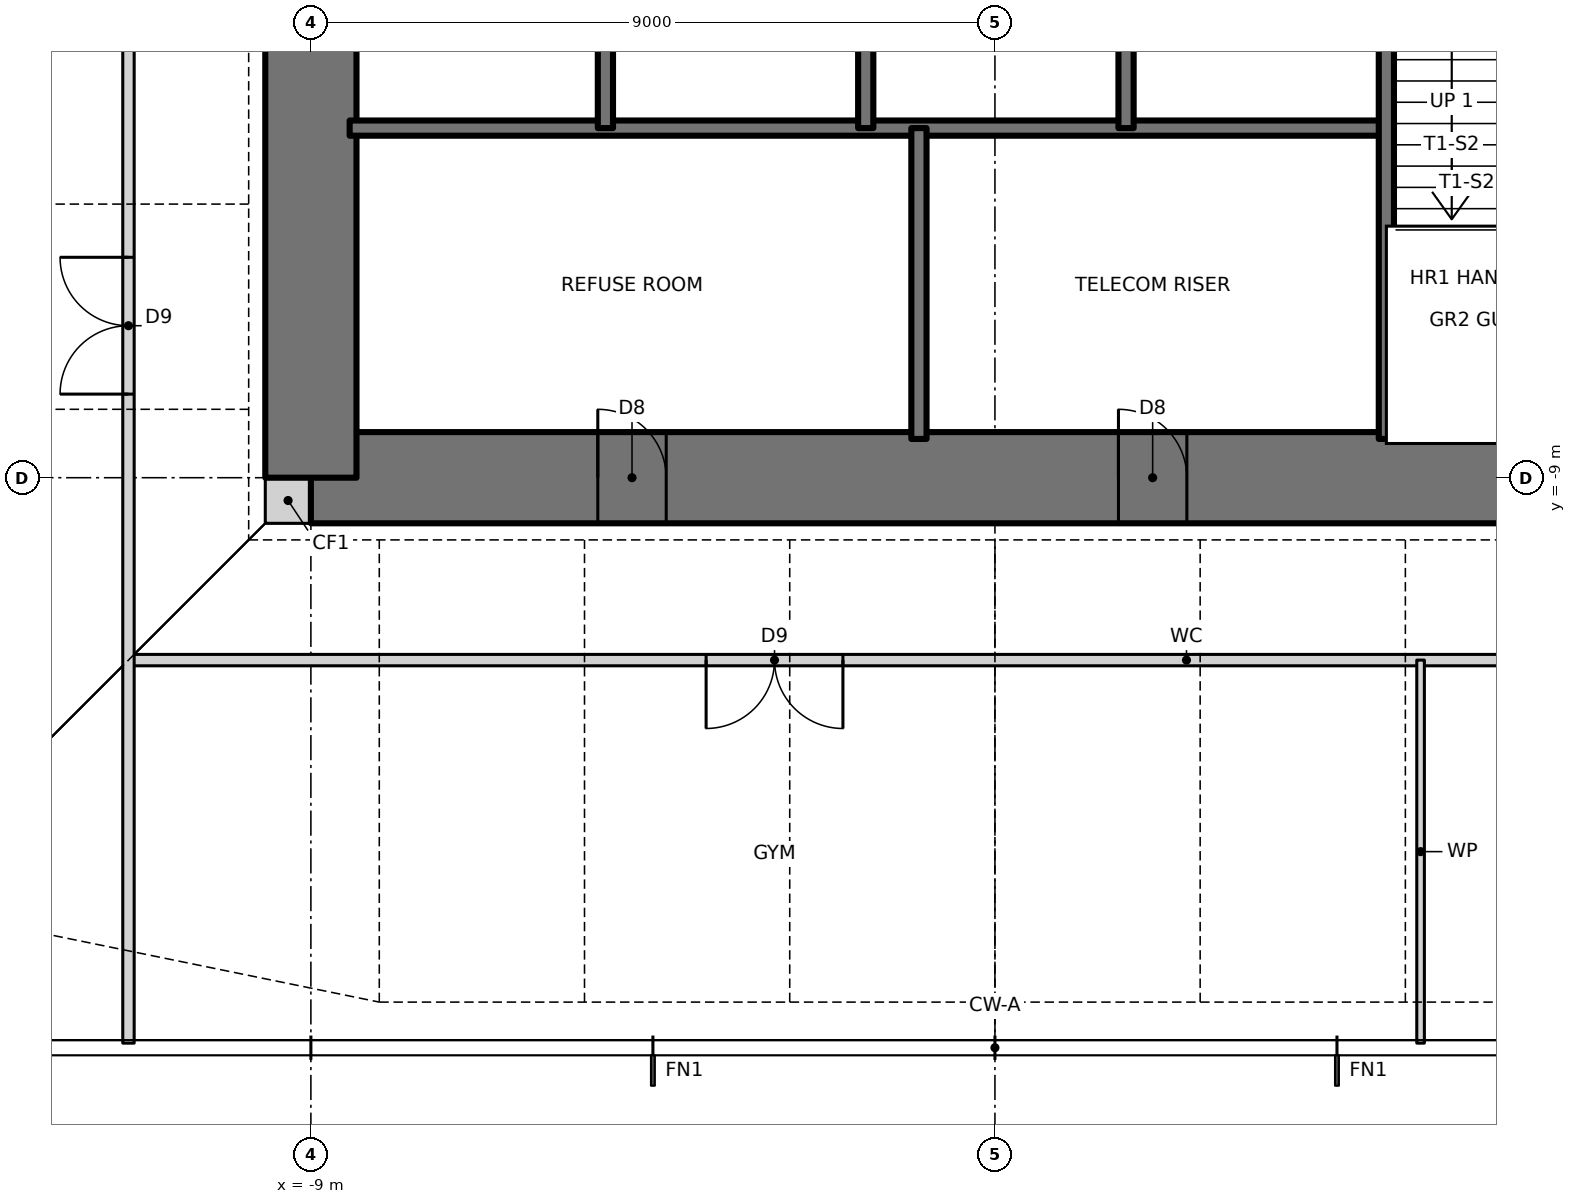
"""IFC4 building model, lengths in metres.
Left out: names, types, materials, properties, quantities, classifications, styles, units other than length and angle.
Written with IfcOpenShell. Run it as: python <this file> out.ifc"""

import sys

from ifc_helpers import new_model, si_unit, direction, frame, frame_2d, origin, place, context, subcontext, project, spatial, rectangle, extrude, element, fill, save


model = new_model("IFC4")
c1 = context("Model", 3, precision=1e-05, world=origin(), true_north=direction((0.0, 1.0)))
c2 = subcontext(c1, "Body", "Model", "MODEL_VIEW")
j1 = project(units=[si_unit("LENGTHUNIT", "METRE"), si_unit("PLANEANGLEUNIT", "RADIAN")], contexts=[c1])
p1 = place(None, origin())
s1 = spatial("IfcSite", under=j1, at=p1, CompositionType="ELEMENT")
p2 = place(p1, origin())
s2 = spatial("IfcBuilding", under=s1, at=p2, CompositionType="ELEMENT")
p3 = place(p2, frame((0.0, 0.0, 215.0)))
s3 = spatial("IfcBuildingStorey", under=s2, at=p3, CompositionType="ELEMENT", Elevation=215.0)
p4 = place(p3, frame((-9.6, -9.3, 0.0), z_axis=(0.0, 0.0, 1.0), x_axis=(1.0, 0.0, 0.0)))
e1 = element("IfcWall", 1, at=p4, inside=s3, PredefinedType="SOLIDWALL", context=c2, shape_type="SweptSolid", body=[
    extrude(rectangle(XDim=0.6, YDim=0.6, at=frame_2d((0.3, 0.0))), origin(), (0.0, 0.0, 1.0), 3.5),
])
p5 = place(p3, frame((-9.0, -9.0, 0.0), z_axis=(0.0, 0.0, 1.0), x_axis=(1.0, 0.0, 0.0)))
e2 = element("IfcWall", 2, at=p5, inside=s3, PredefinedType="SHEAR", context=c2, shape_type="SweptSolid", body=[
    extrude(rectangle(XDim=18.0, YDim=1.2, at=frame_2d((9.0, 0.0))), origin(), (0.0, 0.0, 1.0), 3.5),
])
p6 = place(p5, frame((3.775, 0.0, 0.0)))
e3 = element("IfcOpeningElement", 3, at=p6, cuts=e2, PredefinedType="OPENING", context=c2, shape_type="SweptSolid", body=[
    extrude(rectangle(XDim=0.9, YDim=2.1, at=frame_2d((0.45, 1.05))), frame((0.0, 0.61, 0.0), z_axis=(0.0, -1.0, 0.0), x_axis=(1.0, 0.0, 0.0)), (0.0, 0.0, 1.0), 1.22),
])
p7 = place(p5, frame((10.625, 0.0, 0.0)))
e4 = element("IfcOpeningElement", 4, at=p7, cuts=e2, PredefinedType="OPENING", context=c2, shape_type="SweptSolid", body=[
    extrude(rectangle(XDim=0.9, YDim=2.1, at=frame_2d((0.45, 1.05))), frame((0.0, 0.61, 0.0), z_axis=(0.0, -1.0, 0.0), x_axis=(1.0, 0.0, 0.0)), (0.0, 0.0, 1.0), 1.22),
])
p8 = place(p3, frame((-9.0, 9.0, 0.0), z_axis=(0.0, 0.0, 1.0), x_axis=(0.0, -1.0, 0.0)))
e5 = element("IfcWall", 5, at=p8, inside=s3, PredefinedType="SHEAR", context=c2, shape_type="SweptSolid", body=[
    extrude(rectangle(XDim=18.0, YDim=1.2, at=frame_2d((9.0, 0.0))), origin(), (0.0, 0.0, 1.0), 3.5),
])
p9 = place(p8, frame((8.5, 0.0, 0.0)))
e6 = element("IfcOpeningElement", 6, at=p9, cuts=e5, PredefinedType="OPENING", context=c2, shape_type="SweptSolid", body=[
    extrude(rectangle(XDim=1.0, YDim=2.1, at=frame_2d((0.5, 1.05))), frame((0.0, 0.61, 0.0), z_axis=(0.0, -1.0, 0.0), x_axis=(1.0, 0.0, 0.0)), (0.0, 0.0, 1.0), 1.22),
])
p10 = place(p3, frame((-11.4, -11.4, 0.0), z_axis=(0.0, 0.0, 1.0), x_axis=(1.0, 0.0, 0.0)))
e7 = element("IfcWall", 7, at=p10, inside=s3, PredefinedType="PARTITIONING", context=c2, shape_type="SweptSolid", body=[
    extrude(rectangle(XDim=27.84, YDim=0.15, at=frame_2d((13.92, 0.0))), origin(), (0.0, 0.0, 1.0), 3.27),
])
p11 = place(p10, frame((7.6, 0.0, 0.0)))
e8 = element("IfcOpeningElement", 8, at=p11, cuts=e7, PredefinedType="OPENING", context=c2, shape_type="SweptSolid", body=[
    extrude(rectangle(XDim=1.8, YDim=2.1, at=frame_2d((0.9, 1.05))), frame((0.0, 0.085, 0.0), z_axis=(0.0, -1.0, 0.0), x_axis=(1.0, 0.0, 0.0)), (0.0, 0.0, 1.0), 0.17),
])
p12 = place(p10, frame((19.0, 0.0, 0.0)))
e9 = element("IfcOpeningElement", 9, at=p12, cuts=e7, PredefinedType="OPENING", context=c2, shape_type="SweptSolid", body=[
    extrude(rectangle(XDim=1.8, YDim=2.1, at=frame_2d((0.9, 1.05))), frame((0.0, 0.085, 0.0), z_axis=(0.0, -1.0, 0.0), x_axis=(1.0, 0.0, 0.0)), (0.0, 0.0, 1.0), 0.17),
])
p13 = place(p3, frame((-8.49, -4.4, 0.0), z_axis=(0.0, 0.0, 1.0), x_axis=(1.0, 0.0, 0.0)))
e10 = element("IfcWall", 10, at=p13, inside=s3, PredefinedType="SOLIDWALL", context=c2, shape_type="SweptSolid", body=[
    extrude(rectangle(XDim=13.64, YDim=0.2, at=frame_2d((6.82, 0.0))), origin(), (0.0, 0.0, 1.0), 3.5),
])
p14 = place(p3, frame((5.6, -16.44, 0.0), z_axis=(0.0, 0.0, 1.0), x_axis=(0.0, 1.0, 0.0)))
e11 = element("IfcWall", 11, at=p14, inside=s3, PredefinedType="PARTITIONING", context=c2, shape_type="SweptSolid", body=[
    extrude(rectangle(XDim=5.04, YDim=0.1, at=frame_2d((2.52, 0.0))), origin(), (0.0, 0.0, 1.0), 3.27),
])
p15 = place(p3, frame((5.15, -8.49, 0.0), z_axis=(0.0, 0.0, 1.0), x_axis=(0.0, 1.0, 0.0)))
e12 = element("IfcWall", 12, at=p15, inside=s3, PredefinedType="SOLIDWALL", context=c2, shape_type="SweptSolid", body=[
    extrude(rectangle(XDim=13.09, YDim=0.2, at=frame_2d((6.545, 0.0))), origin(), (0.0, 0.0, 1.0), 3.5),
])
p16 = place(p15, frame((7.89, 0.0, 0.0)))
e13 = element("IfcOpeningElement", 13, at=p16, cuts=e12, PredefinedType="OPENING", context=c2, shape_type="SweptSolid", body=[
    extrude(rectangle(XDim=1.2, YDim=2.1, at=frame_2d((0.6, 1.05))), frame((0.0, 0.11, 0.0), z_axis=(0.0, -1.0, 0.0), x_axis=(1.0, 0.0, 0.0)), (0.0, 0.0, 1.0), 0.22),
])
p17 = place(p3, frame((1.725, -4.4, 0.0), z_axis=(0.0, 0.0, 1.0), x_axis=(0.0, 1.0, 0.0)))
e14 = element("IfcWall", 14, at=p17, inside=s3, PredefinedType="SOLIDWALL", context=c2, shape_type="SweptSolid", body=[
    extrude(rectangle(XDim=2.8, YDim=0.2, at=frame_2d((1.4, 0.0))), origin(), (0.0, 0.0, 1.0), 3.5),
])
p18 = place(p3, frame((-1.0, -8.49, 0.0), z_axis=(0.0, 0.0, 1.0), x_axis=(0.0, 1.0, 0.0)))
e15 = element("IfcWall", 15, at=p18, inside=s3, PredefinedType="SOLIDWALL", context=c2, shape_type="SweptSolid", body=[
    extrude(rectangle(XDim=4.09, YDim=0.2, at=frame_2d((2.045, 0.0))), origin(), (0.0, 0.0, 1.0), 3.5),
])
for number, where, z_axis, x_axis in (
    (16, (-1.7, -4.4, 0.0), (0.0, 0.0, 1.0), (0.0, 1.0, 0.0)),
    (17, (-5.125, -4.4, 0.0), (0.0, 0.0, 1.0), (0.0, 1.0, 0.0)),
):
    element("IfcWall", number, at=place(p3, frame(where, z_axis=z_axis, x_axis=x_axis)), inside=s3, PredefinedType="SOLIDWALL", context=c2, shape_type="SweptSolid", body=[
        extrude(rectangle(XDim=2.8, YDim=0.2, at=frame_2d((1.4, 0.0))), origin(), (0.0, 0.0, 1.0), 3.5),
    ])
p19 = place(p3, frame((-11.4, -16.44, 0.0), z_axis=(0.0, 0.0, 1.0), x_axis=(0.0, 1.0, 0.0)))
e18 = element("IfcWall", 18, at=p19, inside=s3, PredefinedType="PARTITIONING", context=c2, shape_type="SweptSolid", body=[
    extrude(rectangle(XDim=27.84, YDim=0.15, at=frame_2d((13.92, 0.0))), origin(), (0.0, 0.0, 1.0), 3.27),
])
p20 = place(p19, frame((19.94, 0.0, 0.0)))
e19 = element("IfcOpeningElement", 19, at=p20, cuts=e18, PredefinedType="OPENING", context=c2, shape_type="SweptSolid", body=[
    extrude(rectangle(XDim=1.8, YDim=2.1, at=frame_2d((0.9, 1.05))), frame((0.0, 0.085, 0.0), z_axis=(0.0, -1.0, 0.0), x_axis=(1.0, 0.0, 0.0)), (0.0, 0.0, 1.0), 0.17),
])
p21 = place(p19, frame((8.54, 0.0, 0.0)))
e20 = element("IfcOpeningElement", 20, at=p21, cuts=e18, PredefinedType="OPENING", context=c2, shape_type="SweptSolid", body=[
    extrude(rectangle(XDim=1.8, YDim=2.1, at=frame_2d((0.9, 1.05))), frame((0.0, 0.085, 0.0), z_axis=(0.0, -1.0, 0.0), x_axis=(1.0, 0.0, 0.0)), (0.0, 0.0, 1.0), 0.17),
])
p22 = place(p11, frame((1.8, 0.0, 0.0), z_axis=(0.0, 0.0, 1.0), x_axis=(-1.0, 0.0, 0.0)))
e21 = element("IfcDoor", 21, at=p22, inside=s3, OperationType="DOUBLE_DOOR_SINGLE_SWING", PredefinedType="DOOR", context=c2, shape_type="SweptSolid", body=[
    extrude(rectangle(XDim=1.8, YDim=2.1, at=frame_2d((0.9, 1.05))), frame((0.0, 0.025, 0.0), z_axis=(0.0, -1.0, 0.0), x_axis=(1.0, 0.0, 0.0)), (0.0, 0.0, 1.0), 0.05),
])
fill(e8, e21)
p23 = place(p21, origin())
e22 = element("IfcDoor", 22, at=p23, inside=s3, OperationType="DOUBLE_DOOR_SINGLE_SWING", PredefinedType="DOOR", context=c2, shape_type="SweptSolid", body=[
    extrude(rectangle(XDim=1.8, YDim=2.1, at=frame_2d((0.9, 1.05))), frame((0.0, 0.025, 0.0), z_axis=(0.0, -1.0, 0.0), x_axis=(1.0, 0.0, 0.0)), (0.0, 0.0, 1.0), 0.05),
])
fill(e20, e22)
p24 = place(p6, origin())
e23 = element("IfcDoor", 23, at=p24, inside=s3, OperationType="SINGLE_SWING_LEFT", PredefinedType="DOOR", context=c2, shape_type="SweptSolid", body=[
    extrude(rectangle(XDim=0.9, YDim=2.1, at=frame_2d((0.45, 1.05))), frame((0.0, 0.025, 0.0), z_axis=(0.0, -1.0, 0.0), x_axis=(1.0, 0.0, 0.0)), (0.0, 0.0, 1.0), 0.05),
])
fill(e3, e23)
p25 = place(p7, origin())
e24 = element("IfcDoor", 24, at=p25, inside=s3, OperationType="SINGLE_SWING_LEFT", PredefinedType="DOOR", context=c2, shape_type="SweptSolid", body=[
    extrude(rectangle(XDim=0.9, YDim=2.1, at=frame_2d((0.45, 1.05))), frame((0.0, 0.025, 0.0), z_axis=(0.0, -1.0, 0.0), x_axis=(1.0, 0.0, 0.0)), (0.0, 0.0, 1.0), 0.05),
])
fill(e4, e24)
save(model, sys.argv[1])
